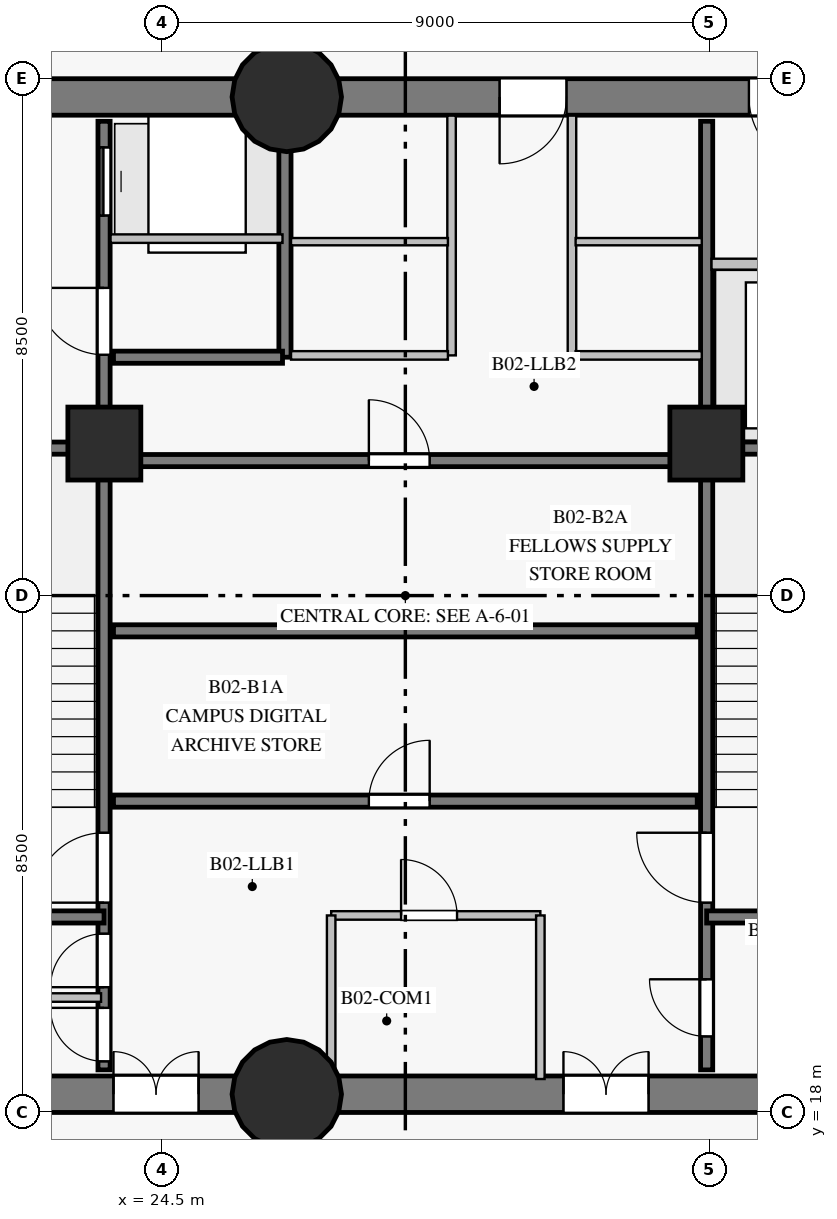
"""IFC4 building model, lengths in metres.
Left out: names, types, materials, properties, quantities, classifications, styles, units other than length and angle.
Written with IfcOpenShell. Run it as: python <this file> out.ifc"""

import sys

from ifc_helpers import new_model, si_unit, direction, frame, frame_2d, origin, origin_with_axes, origin_2d, place, context, subcontext, project, spatial, rectangle, circle, extrude, source, transform, mapped, element, fill, save


model = new_model("IFC4")
c1 = context("Model", 3, precision=1e-05, world=origin(), true_north=direction((0.0, 1.0)))
c2 = subcontext(c1, "Body", "Model", "MODEL_VIEW")
j1 = project(units=[si_unit("LENGTHUNIT", "METRE"), si_unit("PLANEANGLEUNIT", "RADIAN")], contexts=[c1])
p1 = place(None, origin())
s1 = spatial("IfcSite", under=j1, at=p1, CompositionType="ELEMENT")
p2 = place(p1, origin())
s2 = spatial("IfcBuilding", under=s1, at=p2, CompositionType="ELEMENT")
p3 = place(p2, frame((0.0, 0.0, -8.4)))
s3 = spatial("IfcBuildingStorey", under=s2, at=p3, CompositionType="ELEMENT", Elevation=-8.4)
p4 = place(p3, frame((19.5, 18.3, 0.0), z_axis=(0.0, 0.0, 1.0), x_axis=(1.0, 0.0, 0.0)))
e1 = element("IfcWall", 1, at=p4, inside=s3, PredefinedType="SHEAR", context=c2, shape_type="SweptSolid", body=[
    extrude(rectangle(XDim=7.05, YDim=0.6, at=frame_2d((3.525, 0.0))), origin(), (0.0, 0.0, 1.0), 3.85),
])
p5 = place(p4, frame((4.2, 0.0, 0.0)))
e2 = element("IfcOpeningElement", 2, at=p5, cuts=e1, PredefinedType="OPENING", context=c2, shape_type="SweptSolid", body=[
    extrude(rectangle(XDim=1.4, YDim=2.2, at=frame_2d((0.7, 1.1))), frame((0.0, 0.31, 0.0), z_axis=(0.0, -1.0, 0.0), x_axis=(1.0, 0.0, 0.0)), (0.0, 0.0, 1.0), 0.62),
])
p6 = place(p3, frame((26.55, 18.3, 0.0), z_axis=(0.0, 0.0, 1.0), x_axis=(1.0, 0.0, 0.0)))
e3 = element("IfcWall", 3, at=p6, inside=s3, PredefinedType="SHEAR", context=c2, shape_type="SweptSolid", body=[
    extrude(rectangle(XDim=10.95, YDim=0.6, at=frame_2d((5.475, 0.0))), origin(), (0.0, 0.0, 1.0), 3.85),
])
p7 = place(p6, frame((4.55, 0.0, 0.0)))
e4 = element("IfcOpeningElement", 4, at=p7, cuts=e3, PredefinedType="OPENING", context=c2, shape_type="SweptSolid", body=[
    extrude(rectangle(XDim=1.4, YDim=2.2, at=frame_2d((0.7, 1.1))), frame((0.0, 0.31, 0.0), z_axis=(0.0, -1.0, 0.0), x_axis=(1.0, 0.0, 0.0)), (0.0, 0.0, 1.0), 0.62),
])
p8 = place(p3, frame((37.5, 34.7, 0.0), z_axis=(0.0, 0.0, 1.0), x_axis=(-1.0, 0.0, 0.0)))
e5 = element("IfcWall", 5, at=p8, inside=s3, PredefinedType="SHEAR", context=c2, shape_type="SweptSolid", body=[
    extrude(rectangle(XDim=10.95, YDim=0.6, at=frame_2d((5.475, 0.0))), origin(), (0.0, 0.0, 1.0), 3.85),
])
p9 = place(p8, frame((2.15, 0.0, 0.0)))
e6 = element("IfcOpeningElement", 6, at=p9, cuts=e5, PredefinedType="OPENING", context=c2, shape_type="SweptSolid", body=[
    extrude(rectangle(XDim=1.2, YDim=2.15, at=frame_2d((0.6, 1.075))), frame((0.0, 0.31, 0.0), z_axis=(0.0, -1.0, 0.0), x_axis=(1.0, 0.0, 0.0)), (0.0, 0.0, 1.0), 0.62),
])
p10 = place(p8, frame((6.35, 0.0, 0.0)))
e7 = element("IfcOpeningElement", 7, at=p10, cuts=e5, PredefinedType="OPENING", context=c2, shape_type="SweptSolid", body=[
    extrude(rectangle(XDim=1.1, YDim=2.15, at=frame_2d((0.55, 1.075))), frame((0.0, 0.31, 0.0), z_axis=(0.0, -1.0, 0.0), x_axis=(1.0, 0.0, 0.0)), (0.0, 0.0, 1.0), 0.62),
])
p11 = place(p3, frame((26.55, 34.7, 0.0), z_axis=(0.0, 0.0, 1.0), x_axis=(-1.0, 0.0, 0.0)))
e8 = element("IfcWall", 8, at=p11, inside=s3, PredefinedType="SHEAR", context=c2, shape_type="SweptSolid", body=[
    extrude(rectangle(XDim=7.05, YDim=0.6, at=frame_2d((3.525, 0.0))), origin(), (0.0, 0.0, 1.0), 3.85),
])
p12 = place(p11, frame((4.25, 0.0, 0.0)))
e9 = element("IfcOpeningElement", 9, at=p12, cuts=e8, PredefinedType="OPENING", context=c2, shape_type="SweptSolid", body=[
    extrude(rectangle(XDim=1.1, YDim=2.15, at=frame_2d((0.55, 1.075))), frame((0.0, 0.31, 0.0), z_axis=(0.0, -1.0, 0.0), x_axis=(1.0, 0.0, 0.0)), (0.0, 0.0, 1.0), 0.62),
])
m1 = source(origin_with_axes(), c2, "Body", "SweptSolid", [
    extrude(circle(Radius=0.9, at=origin_2d()), origin(), (0.0, 0.0, 1.0), 4.2),
])
for number, where, z_axis, x_axis in (
    (10, (26.55, 18.3, 0.0), (0.0, 0.0, 1.0), (1.0, 0.0, 0.0)),
    (11, (26.55, 34.7, 0.0), (0.0, 0.0, 1.0), (1.0, 0.0, 0.0)),
):
    element("IfcColumn", number, at=place(p3, frame(where, z_axis=z_axis, x_axis=x_axis)), inside=s3, PredefinedType="COLUMN", context=c2, shape_type="MappedRepresentation", body=[
        mapped(m1, transform((0.0, 0.0, 0.0), scale=1.0)),
    ])
m2 = source(origin_with_axes(), c2, "Body", "SweptSolid", [
    extrude(rectangle(XDim=1.2, YDim=1.2, at=origin_2d()), origin(), (0.0, 0.0, 1.0), 4.2),
])
for number, where, z_axis, x_axis in (
    (12, (23.55, 29.0, 0.0), (0.0, 0.0, 1.0), (1.0, 0.0, 0.0)),
    (13, (33.45, 29.0, 0.0), (0.0, 0.0, 1.0), (1.0, 0.0, 0.0)),
):
    element("IfcColumn", number, at=place(p3, frame(where, z_axis=z_axis, x_axis=x_axis)), inside=s3, PredefinedType="COLUMN", context=c2, shape_type="MappedRepresentation", body=[
        mapped(m2, transform((0.0, 0.0, 0.0), scale=1.0)),
    ])
p13 = place(p3, frame((23.545, 18.7, 0.0), z_axis=(0.0, 0.0, 1.0), x_axis=(0.0, 1.0, 0.0)))
e14 = element("IfcWall", 14, at=p13, inside=s3, PredefinedType="SHEAR", context=c2, shape_type="SweptSolid", body=[
    extrude(rectangle(XDim=15.6, YDim=0.2, at=frame_2d((7.8, 0.0))), origin(), (0.0, 0.0, 1.0), 3.85),
])
p14 = place(p13, frame((2.75, 0.0, 0.0)))
e15 = element("IfcOpeningElement", 15, at=p14, cuts=e14, PredefinedType="OPENING", context=c2, shape_type="SweptSolid", body=[
    extrude(rectangle(XDim=1.15, YDim=2.15, at=frame_2d((0.575, 1.075))), frame((0.0, 0.11, 0.0), z_axis=(0.0, -1.0, 0.0), x_axis=(1.0, 0.0, 0.0)), (0.0, 0.0, 1.0), 0.22),
])
p15 = place(p13, frame((11.76, 0.0, 0.0)))
e16 = element("IfcOpeningElement", 16, at=p15, cuts=e14, PredefinedType="OPENING", context=c2, shape_type="SweptSolid", body=[
    extrude(rectangle(XDim=1.1, YDim=2.15, at=frame_2d((0.55, 1.075))), frame((0.0, 0.11, 0.0), z_axis=(0.0, -1.0, 0.0), x_axis=(1.0, 0.0, 0.0)), (0.0, 0.0, 1.0), 0.22),
])
p16 = place(p13, frame((0.14, 0.0, 0.0)))
e17 = element("IfcOpeningElement", 17, at=p16, cuts=e14, PredefinedType="OPENING", context=c2, shape_type="SweptSolid", body=[
    extrude(rectangle(XDim=0.88, YDim=2.1, at=frame_2d((0.44, 1.05))), frame((0.0, 0.11, 0.0), z_axis=(0.0, -1.0, 0.0), x_axis=(1.0, 0.0, 0.0)), (0.0, 0.0, 1.0), 0.22),
])
p17 = place(p13, frame((1.36, 0.0, 0.0)))
e18 = element("IfcOpeningElement", 18, at=p17, cuts=e14, PredefinedType="OPENING", context=c2, shape_type="SweptSolid", body=[
    extrude(rectangle(XDim=0.88, YDim=2.1, at=frame_2d((0.44, 1.05))), frame((0.0, 0.11, 0.0), z_axis=(0.0, -1.0, 0.0), x_axis=(1.0, 0.0, 0.0)), (0.0, 0.0, 1.0), 0.22),
])
p18 = place(p13, frame((14.05, 0.0, 0.0)))
e19 = element("IfcOpeningElement", 19, at=p18, cuts=e14, PredefinedType="OPENING", context=c2, shape_type="SweptSolid", body=[
    extrude(rectangle(XDim=1.12, YDim=2.15, at=frame_2d((0.56, 1.075))), frame((0.0, 0.11, 0.0), z_axis=(0.0, -1.0, 0.0), x_axis=(1.0, 0.0, 0.0)), (0.0, 0.0, 1.0), 0.22),
])
p19 = place(p3, frame((33.455, 18.7, 0.0), z_axis=(0.0, 0.0, 1.0), x_axis=(0.0, 1.0, 0.0)))
e20 = element("IfcWall", 20, at=p19, inside=s3, PredefinedType="SHEAR", context=c2, shape_type="SweptSolid", body=[
    extrude(rectangle(XDim=15.6, YDim=0.2, at=frame_2d((7.8, 0.0))), origin(), (0.0, 0.0, 1.0), 3.85),
])
p20 = place(p19, frame((2.75, 0.0, 0.0)))
e21 = element("IfcOpeningElement", 21, at=p20, cuts=e20, PredefinedType="OPENING", context=c2, shape_type="SweptSolid", body=[
    extrude(rectangle(XDim=1.15, YDim=2.15, at=frame_2d((0.575, 1.075))), frame((0.0, 0.11, 0.0), z_axis=(0.0, -1.0, 0.0), x_axis=(1.0, 0.0, 0.0)), (0.0, 0.0, 1.0), 0.22),
])
p21 = place(p19, frame((0.55, 0.0, 0.0)))
e22 = element("IfcOpeningElement", 22, at=p21, cuts=e20, PredefinedType="OPENING", context=c2, shape_type="SweptSolid", body=[
    extrude(rectangle(XDim=0.94, YDim=2.1, at=frame_2d((0.47, 1.05))), frame((0.0, 0.11, 0.0), z_axis=(0.0, -1.0, 0.0), x_axis=(1.0, 0.0, 0.0)), (0.0, 0.0, 1.0), 0.22),
])
p22 = place(p3, frame((23.7, 23.12, 0.0), z_axis=(0.0, 0.0, 1.0), x_axis=(1.0, 0.0, 0.0)))
e23 = element("IfcWall", 23, at=p22, inside=s3, PredefinedType="SHEAR", context=c2, shape_type="SweptSolid", body=[
    extrude(rectangle(XDim=9.6, YDim=0.2, at=frame_2d((4.8, 0.0))), origin(), (0.0, 0.0, 1.0), 3.85),
])
p23 = place(p22, frame((4.2, 0.0, 0.0)))
e24 = element("IfcOpeningElement", 24, at=p23, cuts=e23, PredefinedType="OPENING", context=c2, shape_type="SweptSolid", body=[
    extrude(rectangle(XDim=1.0, YDim=2.15, at=frame_2d((0.5, 1.075))), frame((0.0, 0.11, 0.0), z_axis=(0.0, -1.0, 0.0), x_axis=(1.0, 0.0, 0.0)), (0.0, 0.0, 1.0), 0.22),
])
p24 = place(p3, frame((23.7, 25.92, 0.0), z_axis=(0.0, 0.0, 1.0), x_axis=(1.0, 0.0, 0.0)))
e25 = element("IfcWall", 25, at=p24, inside=s3, PredefinedType="SHEAR", context=c2, shape_type="SweptSolid", body=[
    extrude(rectangle(XDim=9.6, YDim=0.2, at=frame_2d((4.8, 0.0))), origin(), (0.0, 0.0, 1.0), 3.85),
])
p25 = place(p3, frame((23.7, 28.72, 0.0), z_axis=(0.0, 0.0, 1.0), x_axis=(1.0, 0.0, 0.0)))
e26 = element("IfcWall", 26, at=p25, inside=s3, PredefinedType="SHEAR", context=c2, shape_type="SweptSolid", body=[
    extrude(rectangle(XDim=9.6, YDim=0.2, at=frame_2d((4.8, 0.0))), origin(), (0.0, 0.0, 1.0), 3.85),
])
p26 = place(p25, frame((4.2, 0.0, 0.0)))
e27 = element("IfcOpeningElement", 27, at=p26, cuts=e26, PredefinedType="OPENING", context=c2, shape_type="SweptSolid", body=[
    extrude(rectangle(XDim=1.0, YDim=2.15, at=frame_2d((0.5, 1.075))), frame((0.0, 0.11, 0.0), z_axis=(0.0, -1.0, 0.0), x_axis=(1.0, 0.0, 0.0)), (0.0, 0.0, 1.0), 0.22),
])
for number, where, z_axis, x_axis in (
    (28, (33.455, 21.215, 0.0), (0.0, 0.0, 1.0), (1.0, 0.0, 0.0)),
    (29, (33.455, 28.925, 0.0), (0.0, 0.0, 1.0), (1.0, 0.0, 0.0)),
    (30, (19.55, 21.215, 0.0), (0.0, 0.0, 1.0), (1.0, 0.0, 0.0)),
    (31, (19.55, 28.925, 0.0), (0.0, 0.0, 1.0), (1.0, 0.0, 0.0)),
):
    element("IfcWall", number, at=place(p3, frame(where, z_axis=z_axis, x_axis=x_axis)), inside=s3, PredefinedType="SHEAR", context=c2, shape_type="SweptSolid", body=[
        extrude(rectangle(XDim=3.995, YDim=0.2, at=frame_2d((1.998, 0.0))), origin(), (0.0, 0.0, 1.0), 3.85),
    ])
p27 = place(p3, frame((26.52, 30.42, 0.0), z_axis=(0.0, 0.0, 1.0), x_axis=(0.0, 1.0, 0.0)))
e32 = element("IfcWall", 32, at=p27, inside=s3, PredefinedType="SHEAR", context=c2, shape_type="SweptSolid", body=[
    extrude(rectangle(XDim=3.86, YDim=0.2, at=frame_2d((1.93, 0.0))), origin(), (0.0, 0.0, 1.0), 3.85),
])
p28 = place(p3, frame((23.7, 30.42, 0.0), z_axis=(0.0, 0.0, 1.0), x_axis=(1.0, 0.0, 0.0)))
e33 = element("IfcWall", 33, at=p28, inside=s3, PredefinedType="SHEAR", context=c2, shape_type="SweptSolid", body=[
    extrude(rectangle(XDim=2.78, YDim=0.2, at=frame_2d((1.39, 0.0))), origin(), (0.0, 0.0, 1.0), 3.85),
])
for number, where, z_axis, x_axis in (
    (34, (29.26, 30.45, 0.0), (0.0, 0.0, 1.0), (0.0, 1.0, 0.0)),
    (35, (31.24, 30.45, 0.0), (0.0, 0.0, 1.0), (0.0, 1.0, 0.0)),
):
    element("IfcWall", number, at=place(p3, frame(where, z_axis=z_axis, x_axis=x_axis)), inside=s3, PredefinedType="PARTITIONING", context=c2, shape_type="SweptSolid", body=[
        extrude(rectangle(XDim=3.943, YDim=0.14, at=frame_2d((1.972, 0.0))), origin(), (0.0, 0.0, 1.0), 3.85),
    ])
p29 = place(p3, frame((19.807, 19.89, 0.0), z_axis=(0.0, 0.0, 1.0), x_axis=(1.0, 0.0, 0.0)))
e36 = element("IfcWall", 36, at=p29, inside=s3, PredefinedType="PARTITIONING", context=c2, shape_type="SweptSolid", body=[
    extrude(rectangle(XDim=3.689, YDim=0.14, at=frame_2d((1.844, 0.0))), origin(), (0.0, 0.0, 1.0), 3.85),
])
p30 = place(p3, frame((33.535, 31.95, 0.0), z_axis=(0.0, 0.0, 1.0), x_axis=(1.0, 0.0, 0.0)))
e37 = element("IfcWall", 37, at=p30, inside=s3, PredefinedType="PARTITIONING", context=c2, shape_type="SweptSolid", body=[
    extrude(rectangle(XDim=3.658, YDim=0.18, at=frame_2d((1.829, 0.0))), origin(), (0.0, 0.0, 1.0), 3.85),
])
p31 = place(p30, frame((0.9, 0.0, 0.0)))
e38 = element("IfcOpeningElement", 38, at=p31, cuts=e37, PredefinedType="OPENING", context=c2, shape_type="SweptSolid", body=[
    extrude(rectangle(XDim=1.3, YDim=2.2, at=frame_2d((0.65, 1.1))), frame((0.0, 0.1, 0.0), z_axis=(0.0, -1.0, 0.0), x_axis=(1.0, 0.0, 0.0)), (0.0, 0.0, 1.0), 0.2),
])
p32 = place(p3, frame((27.28, 21.24, 0.0), z_axis=(0.0, 0.0, 1.0), x_axis=(1.0, 0.0, 0.0)))
e39 = element("IfcWall", 39, at=p32, inside=s3, PredefinedType="PARTITIONING", context=c2, shape_type="SweptSolid", body=[
    extrude(rectangle(XDim=3.44, YDim=0.14, at=frame_2d((1.72, 0.0))), origin(), (0.0, 0.0, 1.0), 3.85),
])
p33 = place(p32, frame((1.15, 0.0, 0.0)))
e40 = element("IfcOpeningElement", 40, at=p33, cuts=e39, PredefinedType="OPENING", context=c2, shape_type="SweptSolid", body=[
    extrude(rectangle(XDim=0.92, YDim=2.1, at=frame_2d((0.46, 1.05))), frame((0.0, 0.08, 0.0), z_axis=(0.0, -1.0, 0.0), x_axis=(1.0, 0.0, 0.0)), (0.0, 0.0, 1.0), 0.16),
])
p34 = place(p3, frame((23.652, 32.37, 0.0), z_axis=(0.0, 0.0, 1.0), x_axis=(1.0, 0.0, 0.0)))
e41 = element("IfcWall", 41, at=p34, inside=s3, PredefinedType="PARTITIONING", context=c2, shape_type="SweptSolid", body=[
    extrude(rectangle(XDim=2.828, YDim=0.14, at=frame_2d((1.414, 0.0))), origin(), (0.0, 0.0, 1.0), 3.85),
])
for number, where, z_axis, x_axis in (
    (42, (27.28, 18.55, 0.0), (0.0, 0.0, 1.0), (0.0, 1.0, 0.0)),
    (43, (30.72, 18.55, 0.0), (0.0, 0.0, 1.0), (0.0, 1.0, 0.0)),
):
    element("IfcWall", number, at=place(p3, frame(where, z_axis=z_axis, x_axis=x_axis)), inside=s3, PredefinedType="PARTITIONING", context=c2, shape_type="SweptSolid", body=[
        extrude(rectangle(XDim=2.69, YDim=0.14, at=frame_2d((1.345, 0.0))), origin(), (0.0, 0.0, 1.0), 3.85),
    ])
p35 = place(p3, frame((26.62, 30.45, 0.0), z_axis=(0.0, 0.0, 1.0), x_axis=(1.0, 0.0, 0.0)))
e44 = element("IfcWall", 44, at=p35, inside=s3, PredefinedType="PARTITIONING", context=c2, shape_type="SweptSolid", body=[
    extrude(rectangle(XDim=2.58, YDim=0.14, at=frame_2d((1.29, 0.0))), origin(), (0.0, 0.0, 1.0), 3.85),
])
p36 = place(p3, frame((26.62, 32.32, 0.0), z_axis=(0.0, 0.0, 1.0), x_axis=(1.0, 0.0, 0.0)))
e45 = element("IfcWall", 45, at=p36, inside=s3, PredefinedType="PARTITIONING", context=c2, shape_type="SweptSolid", body=[
    extrude(rectangle(XDim=2.58, YDim=0.12, at=frame_2d((1.29, 0.0))), origin(), (0.0, 0.0, 1.0), 3.85),
])
p37 = place(p3, frame((31.3, 30.45, 0.0), z_axis=(0.0, 0.0, 1.0), x_axis=(1.0, 0.0, 0.0)))
e46 = element("IfcWall", 46, at=p37, inside=s3, PredefinedType="PARTITIONING", context=c2, shape_type="SweptSolid", body=[
    extrude(rectangle(XDim=2.075, YDim=0.14, at=frame_2d((1.038, 0.0))), origin(), (0.0, 0.0, 1.0), 3.85),
])
p38 = place(p3, frame((31.3, 32.32, 0.0), z_axis=(0.0, 0.0, 1.0), x_axis=(1.0, 0.0, 0.0)))
e47 = element("IfcWall", 47, at=p38, inside=s3, PredefinedType="PARTITIONING", context=c2, shape_type="SweptSolid", body=[
    extrude(rectangle(XDim=2.075, YDim=0.12, at=frame_2d((1.038, 0.0))), origin(), (0.0, 0.0, 1.0), 3.85),
])
m3 = source(origin_with_axes(), c2, "Body", "SweptSolid", [
    extrude(rectangle(XDim=1.15, YDim=2.15, at=frame_2d((0.575, 1.075))), frame((0.0, 0.025, 0.0), z_axis=(0.0, -1.0, 0.0), x_axis=(1.0, 0.0, 0.0)), (0.0, 0.0, 1.0), 0.05),
])
p39 = place(p14, origin())
e48 = element("IfcDoor", 48, at=p39, inside=s3, OperationType="SINGLE_SWING_LEFT", PredefinedType="DOOR", context=c2, shape_type="MappedRepresentation", body=[
    mapped(m3, transform((0.0, 0.0, 0.0), scale=1.0)),
])
fill(e15, e48)
p40 = place(p20, origin())
e49 = element("IfcDoor", 49, at=p40, inside=s3, OperationType="SINGLE_SWING_RIGHT", PredefinedType="DOOR", context=c2, shape_type="MappedRepresentation", body=[
    mapped(m3, transform((0.0, 0.0, 0.0), scale=1.0)),
])
fill(e21, e49)
m4 = source(origin_with_axes(), c2, "Body", "SweptSolid", [
    extrude(rectangle(XDim=1.1, YDim=2.15, at=frame_2d((0.55, 1.075))), frame((0.0, 0.025, 0.0), z_axis=(0.0, -1.0, 0.0), x_axis=(1.0, 0.0, 0.0)), (0.0, 0.0, 1.0), 0.05),
])
p41 = place(p15, origin())
e50 = element("IfcDoor", 50, at=p41, inside=s3, OperationType="SINGLE_SWING_RIGHT", PredefinedType="DOOR", context=c2, shape_type="MappedRepresentation", body=[
    mapped(m4, transform((0.0, 0.0, 0.0), scale=1.0)),
])
fill(e16, e50)
m5 = source(origin_with_axes(), c2, "Body", "SweptSolid", [
    extrude(rectangle(XDim=1.2, YDim=2.15, at=frame_2d((0.6, 1.075))), frame((0.0, 0.025, 0.0), z_axis=(0.0, -1.0, 0.0), x_axis=(1.0, 0.0, 0.0)), (0.0, 0.0, 1.0), 0.05),
])
p42 = place(p9, origin())
e51 = element("IfcDoor", 51, at=p42, inside=s3, OperationType="SINGLE_SWING_LEFT", PredefinedType="DOOR", context=c2, shape_type="MappedRepresentation", body=[
    mapped(m5, transform((0.0, 0.0, 0.0), scale=1.0)),
])
fill(e6, e51)
m6 = source(origin_with_axes(), c2, "Body", "SweptSolid", [
    extrude(rectangle(XDim=0.88, YDim=2.1, at=frame_2d((0.44, 1.05))), frame((0.0, 0.025, 0.0), z_axis=(0.0, -1.0, 0.0), x_axis=(1.0, 0.0, 0.0)), (0.0, 0.0, 1.0), 0.05),
])
p43 = place(p16, origin())
e52 = element("IfcDoor", 52, at=p43, inside=s3, OperationType="SINGLE_SWING_RIGHT", PredefinedType="DOOR", context=c2, shape_type="MappedRepresentation", body=[
    mapped(m6, transform((0.0, 0.0, 0.0), scale=1.0)),
])
fill(e17, e52)
p44 = place(p17, origin())
e53 = element("IfcDoor", 53, at=p44, inside=s3, OperationType="SINGLE_SWING_LEFT", PredefinedType="DOOR", context=c2, shape_type="MappedRepresentation", body=[
    mapped(m6, transform((0.0, 0.0, 0.0), scale=1.0)),
])
fill(e18, e53)
m7 = source(origin_with_axes(), c2, "Body", "SweptSolid", [
    extrude(rectangle(XDim=1.4, YDim=2.2, at=frame_2d((0.7, 1.1))), frame((0.0, 0.025, 0.0), z_axis=(0.0, -1.0, 0.0), x_axis=(1.0, 0.0, 0.0)), (0.0, 0.0, 1.0), 0.05),
])
p45 = place(p5, origin())
e54 = element("IfcDoor", 54, at=p45, inside=s3, OperationType="DOUBLE_DOOR_SINGLE_SWING", PredefinedType="DOOR", context=c2, shape_type="MappedRepresentation", body=[
    mapped(m7, transform((0.0, 0.0, 0.0), scale=1.0)),
])
fill(e2, e54)
p46 = place(p7, origin())
e55 = element("IfcDoor", 55, at=p46, inside=s3, OperationType="DOUBLE_DOOR_SINGLE_SWING", PredefinedType="DOOR", context=c2, shape_type="MappedRepresentation", body=[
    mapped(m7, transform((0.0, 0.0, 0.0), scale=1.0)),
])
fill(e4, e55)
m8 = source(origin_with_axes(), c2, "Body", "SweptSolid", [
    extrude(rectangle(XDim=0.94, YDim=2.1, at=frame_2d((0.47, 1.05))), frame((0.0, 0.025, 0.0), z_axis=(0.0, -1.0, 0.0), x_axis=(1.0, 0.0, 0.0)), (0.0, 0.0, 1.0), 0.05),
])
p47 = place(p21, origin())
e56 = element("IfcDoor", 56, at=p47, inside=s3, OperationType="SINGLE_SWING_RIGHT", PredefinedType="DOOR", context=c2, shape_type="MappedRepresentation", body=[
    mapped(m8, transform((0.0, 0.0, 0.0), scale=1.0)),
])
fill(e22, e56)
m9 = source(origin_with_axes(), c2, "Body", "SweptSolid", [
    extrude(rectangle(XDim=0.92, YDim=2.1, at=frame_2d((0.46, 1.05))), frame((0.0, 0.025, 0.0), z_axis=(0.0, -1.0, 0.0), x_axis=(1.0, 0.0, 0.0)), (0.0, 0.0, 1.0), 0.05),
])
p48 = place(p33, origin())
e57 = element("IfcDoor", 57, at=p48, inside=s3, OperationType="SINGLE_SWING_LEFT", PredefinedType="DOOR", context=c2, shape_type="MappedRepresentation", body=[
    mapped(m9, transform((0.0, 0.0, 0.0), scale=1.0)),
])
fill(e40, e57)
m10 = source(origin_with_axes(), c2, "Body", "SweptSolid", [
    extrude(rectangle(XDim=1.0, YDim=2.15, at=frame_2d((0.5, 1.075))), frame((0.0, 0.025, 0.0), z_axis=(0.0, -1.0, 0.0), x_axis=(1.0, 0.0, 0.0)), (0.0, 0.0, 1.0), 0.05),
])
p49 = place(p23, origin())
e58 = element("IfcDoor", 58, at=p49, inside=s3, OperationType="SINGLE_SWING_RIGHT", PredefinedType="DOOR", context=c2, shape_type="MappedRepresentation", body=[
    mapped(m10, transform((0.0, 0.0, 0.0), scale=1.0)),
])
fill(e24, e58)
p50 = place(p26, origin())
e59 = element("IfcDoor", 59, at=p50, inside=s3, OperationType="SINGLE_SWING_LEFT", PredefinedType="DOOR", context=c2, shape_type="MappedRepresentation", body=[
    mapped(m10, transform((0.0, 0.0, 0.0), scale=1.0)),
])
fill(e27, e59)
p51 = place(p10, origin())
e60 = element("IfcDoor", 60, at=p51, inside=s3, OperationType="SINGLE_SWING_RIGHT", PredefinedType="DOOR", context=c2, shape_type="MappedRepresentation", body=[
    mapped(m4, transform((0.0, 0.0, 0.0), scale=1.0)),
])
fill(e7, e60)
m11 = source(origin_with_axes(), c2, "Body", "SweptSolid", [
    extrude(rectangle(XDim=1.12, YDim=2.15, at=frame_2d((0.56, 1.075))), frame((0.0, 0.025, 0.0), z_axis=(0.0, -1.0, 0.0), x_axis=(1.0, 0.0, 0.0)), (0.0, 0.0, 1.0), 0.05),
])
p52 = place(p18, origin())
e61 = element("IfcDoor", 61, at=p52, inside=s3, OperationType="SLIDING_TO_RIGHT", PredefinedType="DOOR", context=c2, shape_type="MappedRepresentation", body=[
    mapped(m11, transform((0.0, 0.0, 0.0), scale=1.0)),
])
fill(e19, e61)
save(model, sys.argv[1])
